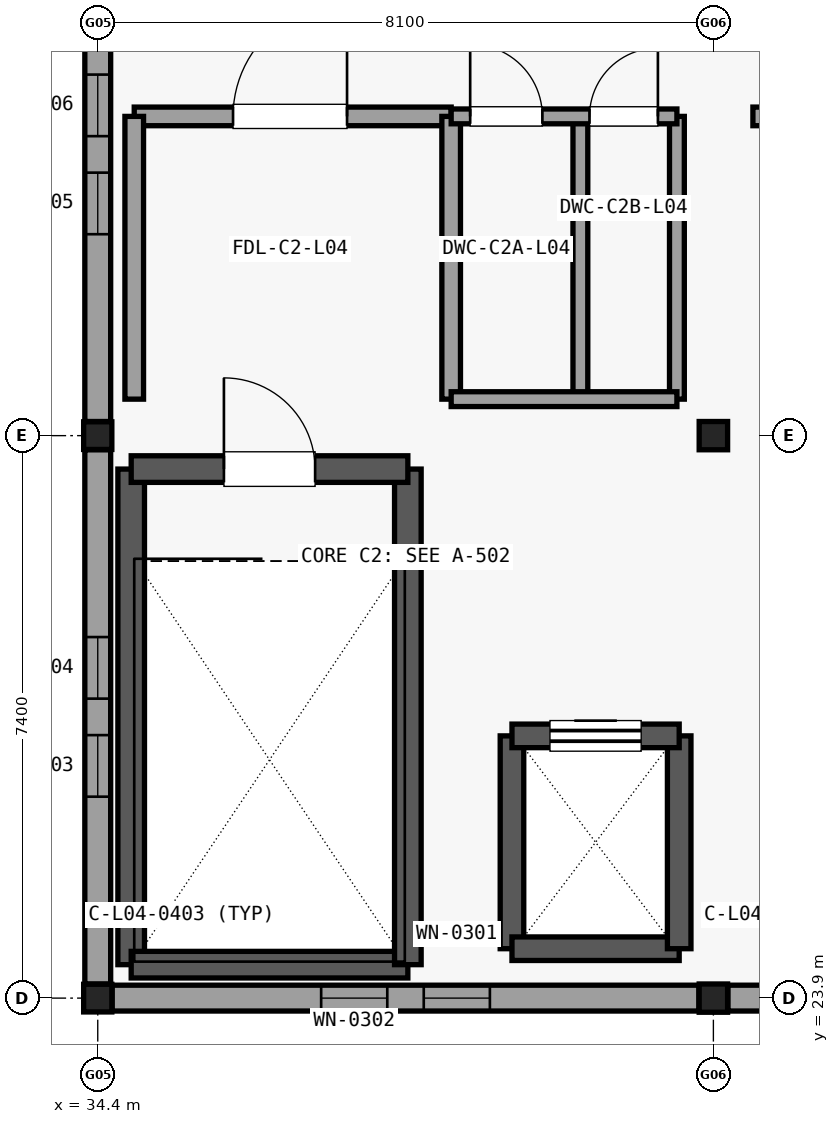
"""IFC4 building model, lengths in metres.
Left out: names, types, materials, properties, quantities, classifications, styles, units other than length and angle.
Written with IfcOpenShell. Run it as: python <this file> out.ifc"""

import sys

from ifc_helpers import new_model, si_unit, direction, frame, frame_2d, origin, origin_2d, place, context, subcontext, project, spatial, rectangle, i_section, extrude, element, fill, save


model = new_model("IFC4")
c1 = context("Model", 3, precision=1e-05, world=origin(), true_north=direction((0.0, 1.0)))
c2 = subcontext(c1, "Body", "Model", "MODEL_VIEW")
j1 = project(units=[si_unit("LENGTHUNIT", "METRE"), si_unit("PLANEANGLEUNIT", "RADIAN")], contexts=[c1])
p1 = place(None, origin())
s1 = spatial("IfcSite", under=j1, at=p1, CompositionType="ELEMENT")
p2 = place(p1, origin())
s2 = spatial("IfcBuilding", under=s1, at=p2, CompositionType="ELEMENT")
p3 = place(p2, frame((0.0, 0.0, 17.4)))
s3 = spatial("IfcBuildingStorey", under=s2, at=p3, CompositionType="ELEMENT", Elevation=17.4)
for number, where, z_axis, x_axis in (
    (1, (34.4, 23.9, 0.0), (0.0, 0.0, 1.0), (1.0, 0.0, 0.0)),
    (2, (34.4, 31.3, 0.0), (0.0, 0.0, 1.0), (1.0, 0.0, 0.0)),
):
    element("IfcColumn", number, at=place(p3, frame(where, z_axis=z_axis, x_axis=x_axis)), inside=s3, PredefinedType="COLUMN", context=c2, shape_type="SweptSolid", body=[
        extrude(i_section(OverallWidth=0.371, OverallDepth=0.364, WebThickness=0.013, FlangeThickness=0.022, at=origin_2d()), origin(), (0.0, 0.0, 1.0), 3.38),
    ])
for number, where, z_axis, x_axis in (
    (3, (42.5, 23.9, 0.0), (0.0, 0.0, 1.0), (1.0, 0.0, 0.0)),
    (4, (42.5, 31.3, 0.0), (0.0, 0.0, 1.0), (1.0, 0.0, 0.0)),
):
    element("IfcColumn", number, at=place(p3, frame(where, z_axis=z_axis, x_axis=x_axis)), inside=s3, PredefinedType="COLUMN", context=c2, shape_type="SweptSolid", body=[
        extrude(i_section(OverallWidth=0.374, OverallDepth=0.372, WebThickness=0.016, FlangeThickness=0.026, at=origin_2d()), origin(), (0.0, 0.0, 1.0), 3.38),
    ])
p4 = place(p3, frame((42.309, 23.9, 0.0), z_axis=(0.0, 0.0, 1.0), x_axis=(-1.0, 0.0, 0.0)))
e5 = element("IfcWall", 5, at=p4, inside=s3, PredefinedType="SOLIDWALL", context=c2, shape_type="SweptSolid", body=[
    extrude(rectangle(XDim=7.719, YDim=0.34, at=frame_2d((3.86, 0.0))), origin(), (0.0, 0.0, 1.0), 2.908),
])
p5 = place(p4, frame((2.75, 0.0, 0.6)))
e6 = element("IfcOpeningElement", 6, at=p5, cuts=e5, PredefinedType="OPENING", context=c2, shape_type="SweptSolid", body=[
    extrude(rectangle(XDim=0.87, YDim=1.82, at=frame_2d((0.435, 0.91))), frame((0.0, 0.18, 0.0), z_axis=(0.0, -1.0, 0.0), x_axis=(1.0, 0.0, 0.0)), (0.0, 0.0, 1.0), 0.36),
])
p6 = place(p4, frame((4.1, 0.0, 0.6)))
e7 = element("IfcOpeningElement", 7, at=p6, cuts=e5, PredefinedType="OPENING", context=c2, shape_type="SweptSolid", body=[
    extrude(rectangle(XDim=0.87, YDim=1.82, at=frame_2d((0.435, 0.91))), frame((0.0, 0.18, 0.0), z_axis=(0.0, -1.0, 0.0), x_axis=(1.0, 0.0, 0.0)), (0.0, 0.0, 1.0), 0.36),
])
p7 = place(p3, frame((34.4, 24.086, 0.0), z_axis=(0.0, 0.0, 1.0), x_axis=(0.0, 1.0, 0.0)))
e8 = element("IfcWall", 8, at=p7, inside=s3, PredefinedType="SOLIDWALL", context=c2, shape_type="SweptSolid", body=[
    extrude(rectangle(XDim=7.028, YDim=0.34, at=frame_2d((3.514, 0.0))), origin(), (0.0, 0.0, 1.0), 2.908),
])
p8 = place(p7, frame((2.464, 0.0, 0.6)))
e9 = element("IfcOpeningElement", 9, at=p8, cuts=e8, PredefinedType="OPENING", context=c2, shape_type="SweptSolid", body=[
    extrude(rectangle(XDim=0.81, YDim=1.84, at=frame_2d((0.405, 0.92))), frame((0.0, 0.18, 0.0), z_axis=(0.0, -1.0, 0.0), x_axis=(1.0, 0.0, 0.0)), (0.0, 0.0, 1.0), 0.36),
])
p9 = place(p7, frame((3.754, 0.0, 0.6)))
e10 = element("IfcOpeningElement", 10, at=p9, cuts=e8, PredefinedType="OPENING", context=c2, shape_type="SweptSolid", body=[
    extrude(rectangle(XDim=0.81, YDim=1.84, at=frame_2d((0.405, 0.92))), frame((0.0, 0.18, 0.0), z_axis=(0.0, -1.0, 0.0), x_axis=(1.0, 0.0, 0.0)), (0.0, 0.0, 1.0), 0.36),
])
p10 = place(p3, frame((34.4, 31.486, 0.0), z_axis=(0.0, 0.0, 1.0), x_axis=(0.0, 1.0, 0.0)))
e11 = element("IfcWall", 11, at=p10, inside=s3, PredefinedType="SOLIDWALL", context=c2, shape_type="SweptSolid", body=[
    extrude(rectangle(XDim=7.028, YDim=0.34, at=frame_2d((3.514, 0.0))), origin(), (0.0, 0.0, 1.0), 2.908),
])
p11 = place(p10, frame((2.464, 0.0, 0.6)))
e12 = element("IfcOpeningElement", 12, at=p11, cuts=e11, PredefinedType="OPENING", context=c2, shape_type="SweptSolid", body=[
    extrude(rectangle(XDim=0.81, YDim=1.84, at=frame_2d((0.405, 0.92))), frame((0.0, 0.18, 0.0), z_axis=(0.0, -1.0, 0.0), x_axis=(1.0, 0.0, 0.0)), (0.0, 0.0, 1.0), 0.36),
])
p12 = place(p10, frame((3.754, 0.0, 0.6)))
e13 = element("IfcOpeningElement", 13, at=p12, cuts=e11, PredefinedType="OPENING", context=c2, shape_type="SweptSolid", body=[
    extrude(rectangle(XDim=0.81, YDim=1.84, at=frame_2d((0.405, 0.92))), frame((0.0, 0.18, 0.0), z_axis=(0.0, -1.0, 0.0), x_axis=(1.0, 0.0, 0.0)), (0.0, 0.0, 1.0), 0.36),
])
p13 = place(p3, frame((50.409, 23.9, 0.0), z_axis=(0.0, 0.0, 1.0), x_axis=(-1.0, 0.0, 0.0)))
e14 = element("IfcWall", 14, at=p13, inside=s3, PredefinedType="SOLIDWALL", context=c2, shape_type="SweptSolid", body=[
    extrude(rectangle(XDim=7.718, YDim=0.34, at=frame_2d((3.859, 0.0))), origin(), (0.0, 0.0, 1.0), 2.908),
])
p14 = place(p13, frame((2.749, 0.0, 0.6)))
e15 = element("IfcOpeningElement", 15, at=p14, cuts=e14, PredefinedType="OPENING", context=c2, shape_type="SweptSolid", body=[
    extrude(rectangle(XDim=0.87, YDim=1.82, at=frame_2d((0.435, 0.91))), frame((0.0, 0.18, 0.0), z_axis=(0.0, -1.0, 0.0), x_axis=(1.0, 0.0, 0.0)), (0.0, 0.0, 1.0), 0.36),
])
p15 = place(p13, frame((4.099, 0.0, 0.6)))
e16 = element("IfcOpeningElement", 16, at=p15, cuts=e14, PredefinedType="OPENING", context=c2, shape_type="SweptSolid", body=[
    extrude(rectangle(XDim=0.87, YDim=1.82, at=frame_2d((0.435, 0.91))), frame((0.0, 0.18, 0.0), z_axis=(0.0, -1.0, 0.0), x_axis=(1.0, 0.0, 0.0)), (0.0, 0.0, 1.0), 0.36),
])
p16 = place(p3, frame((34.84, 24.34, 0.0), z_axis=(0.0, 0.0, 1.0), x_axis=(0.0, 1.0, 0.0)))
e17 = element("IfcWall", 17, at=p16, inside=s3, PredefinedType="SHEAR", context=c2, shape_type="SweptSolid", body=[
    extrude(rectangle(XDim=6.52, YDim=0.35, at=frame_2d((3.26, 0.0))), origin(), (0.0, 0.0, 1.0), 3.375),
])
p17 = place(p3, frame((34.84, 24.34, 0.0), z_axis=(0.0, 0.0, 1.0), x_axis=(1.0, 0.0, 0.0)))
e18 = element("IfcWall", 18, at=p17, inside=s3, PredefinedType="SHEAR", context=c2, shape_type="SweptSolid", body=[
    extrude(rectangle(XDim=3.64, YDim=0.35, at=frame_2d((1.82, 0.0))), origin(), (0.0, 0.0, 1.0), 3.375),
])
p18 = place(p3, frame((38.48, 24.34, 0.0), z_axis=(0.0, 0.0, 1.0), x_axis=(0.0, 1.0, 0.0)))
e19 = element("IfcWall", 19, at=p18, inside=s3, PredefinedType="SHEAR", context=c2, shape_type="SweptSolid", body=[
    extrude(rectangle(XDim=6.52, YDim=0.35, at=frame_2d((3.26, 0.0))), origin(), (0.0, 0.0, 1.0), 3.375),
])
p19 = place(p3, frame((34.84, 30.86, 0.0), z_axis=(0.0, 0.0, 1.0), x_axis=(1.0, 0.0, 0.0)))
e20 = element("IfcWall", 20, at=p19, inside=s3, PredefinedType="SHEAR", context=c2, shape_type="SweptSolid", body=[
    extrude(rectangle(XDim=3.64, YDim=0.35, at=frame_2d((1.82, 0.0))), origin(), (0.0, 0.0, 1.0), 3.375),
])
p20 = place(p19, frame((1.22, 0.0, 0.0)))
e21 = element("IfcOpeningElement", 21, at=p20, cuts=e20, PredefinedType="OPENING", context=c2, shape_type="SweptSolid", body=[
    extrude(rectangle(XDim=1.2, YDim=2.15, at=frame_2d((0.6, 1.075))), frame((0.0, 0.185, 0.0), z_axis=(0.0, -1.0, 0.0), x_axis=(1.0, 0.0, 0.0)), (0.0, 0.0, 1.0), 0.37),
])
p21 = place(p3, frame((39.85, 24.55, 0.0), z_axis=(0.0, 0.0, 1.0), x_axis=(0.0, 1.0, 0.0)))
e22 = element("IfcWall", 22, at=p21, inside=s3, PredefinedType="SHEAR", context=c2, shape_type="SweptSolid", body=[
    extrude(rectangle(XDim=2.8, YDim=0.31, at=frame_2d((1.4, 0.0))), origin(), (0.0, 0.0, 1.0), 3.375),
])
p22 = place(p3, frame((39.85, 24.55, 0.0), z_axis=(0.0, 0.0, 1.0), x_axis=(1.0, 0.0, 0.0)))
e23 = element("IfcWall", 23, at=p22, inside=s3, PredefinedType="SHEAR", context=c2, shape_type="SweptSolid", body=[
    extrude(rectangle(XDim=2.2, YDim=0.31, at=frame_2d((1.1, 0.0))), origin(), (0.0, 0.0, 1.0), 3.375),
])
p23 = place(p3, frame((42.05, 24.55, 0.0), z_axis=(0.0, 0.0, 1.0), x_axis=(0.0, 1.0, 0.0)))
e24 = element("IfcWall", 24, at=p23, inside=s3, PredefinedType="SHEAR", context=c2, shape_type="SweptSolid", body=[
    extrude(rectangle(XDim=2.8, YDim=0.31, at=frame_2d((1.4, 0.0))), origin(), (0.0, 0.0, 1.0), 3.375),
])
p24 = place(p3, frame((39.85, 27.35, 0.0), z_axis=(0.0, 0.0, 1.0), x_axis=(1.0, 0.0, 0.0)))
e25 = element("IfcWall", 25, at=p24, inside=s3, PredefinedType="SHEAR", context=c2, shape_type="SweptSolid", body=[
    extrude(rectangle(XDim=2.2, YDim=0.31, at=frame_2d((1.1, 0.0))), origin(), (0.0, 0.0, 1.0), 3.375),
])
p25 = place(p24, frame((0.5, 0.0, 0.0)))
e26 = element("IfcOpeningElement", 26, at=p25, cuts=e25, PredefinedType="OPENING", context=c2, shape_type="SweptSolid", body=[
    extrude(rectangle(XDim=1.2, YDim=2.15, at=frame_2d((0.6, 1.075))), frame((0.0, 0.165, 0.0), z_axis=(0.0, -1.0, 0.0), x_axis=(1.0, 0.0, 0.0)), (0.0, 0.0, 1.0), 0.33),
])
p26 = place(p3, frame((34.88, 35.5, 0.0), z_axis=(0.0, 0.0, 1.0), x_axis=(1.0, 0.0, 0.0)))
e27 = element("IfcWall", 27, at=p26, inside=s3, PredefinedType="PARTITIONING", context=c2, shape_type="SweptSolid", body=[
    extrude(rectangle(XDim=4.17, YDim=0.245, at=frame_2d((2.085, 0.0))), origin(), (0.0, 0.0, 1.0), 2.913),
])
p27 = place(p26, frame((1.3, 0.0, 0.0)))
e28 = element("IfcOpeningElement", 28, at=p27, cuts=e27, PredefinedType="OPENING", context=c2, shape_type="SweptSolid", body=[
    extrude(rectangle(XDim=1.5, YDim=2.15, at=frame_2d((0.75, 1.075))), frame((0.0, 0.133, 0.0), z_axis=(0.0, -1.0, 0.0), x_axis=(1.0, 0.0, 0.0)), (0.0, 0.0, 1.0), 0.265),
])
for number, where, z_axis, x_axis in (
    (29, (34.88, 31.78, 0.0), (0.0, 0.0, 1.0), (0.0, 1.0, 0.0)),
    (30, (39.05, 31.78, 0.0), (0.0, 0.0, 1.0), (0.0, 1.0, 0.0)),
):
    element("IfcWall", number, at=place(p3, frame(where, z_axis=z_axis, x_axis=x_axis)), inside=s3, PredefinedType="PARTITIONING", context=c2, shape_type="SweptSolid", body=[
        extrude(rectangle(XDim=3.72, YDim=0.245, at=frame_2d((1.86, 0.0))), origin(), (0.0, 0.0, 1.0), 2.913),
    ])
for number, where, z_axis, x_axis in (
    (31, (40.75, 31.78, 0.0), (0.0, 0.0, 1.0), (0.0, 1.0, 0.0)),
    (32, (42.02, 31.78, 0.0), (0.0, 0.0, 1.0), (0.0, 1.0, 0.0)),
):
    element("IfcWall", number, at=place(p3, frame(where, z_axis=z_axis, x_axis=x_axis)), inside=s3, PredefinedType="PARTITIONING", context=c2, shape_type="SweptSolid", body=[
        extrude(rectangle(XDim=3.72, YDim=0.195, at=frame_2d((1.86, 0.0))), origin(), (0.0, 0.0, 1.0), 2.913),
    ])
p28 = place(p3, frame((39.05, 31.78, 0.0), z_axis=(0.0, 0.0, 1.0), x_axis=(1.0, 0.0, 0.0)))
e33 = element("IfcWall", 33, at=p28, inside=s3, PredefinedType="PARTITIONING", context=c2, shape_type="SweptSolid", body=[
    extrude(rectangle(XDim=2.97, YDim=0.195, at=frame_2d((1.485, 0.0))), origin(), (0.0, 0.0, 1.0), 2.913),
])
p29 = place(p3, frame((39.05, 35.5, 0.0), z_axis=(0.0, 0.0, 1.0), x_axis=(1.0, 0.0, 0.0)))
e34 = element("IfcWall", 34, at=p29, inside=s3, PredefinedType="PARTITIONING", context=c2, shape_type="SweptSolid", body=[
    extrude(rectangle(XDim=2.97, YDim=0.195, at=frame_2d((1.485, 0.0))), origin(), (0.0, 0.0, 1.0), 2.913),
])
p30 = place(p29, frame((0.25, 0.0, 0.0)))
e35 = element("IfcOpeningElement", 35, at=p30, cuts=e34, PredefinedType="OPENING", context=c2, shape_type="SweptSolid", body=[
    extrude(rectangle(XDim=0.95, YDim=2.1, at=frame_2d((0.475, 1.05))), frame((0.0, 0.107, 0.0), z_axis=(0.0, -1.0, 0.0), x_axis=(1.0, 0.0, 0.0)), (0.0, 0.0, 1.0), 0.215),
])
p31 = place(p29, frame((1.82, 0.0, 0.0)))
e36 = element("IfcOpeningElement", 36, at=p31, cuts=e34, PredefinedType="OPENING", context=c2, shape_type="SweptSolid", body=[
    extrude(rectangle(XDim=0.9, YDim=2.1, at=frame_2d((0.45, 1.05))), frame((0.0, 0.107, 0.0), z_axis=(0.0, -1.0, 0.0), x_axis=(1.0, 0.0, 0.0)), (0.0, 0.0, 1.0), 0.215),
])
p32 = place(p3, frame((43.02, 35.5, 0.0), z_axis=(0.0, 0.0, 1.0), x_axis=(1.0, 0.0, 0.0)))
e37 = element("IfcWall", 37, at=p32, inside=s3, PredefinedType="PARTITIONING", context=c2, shape_type="SweptSolid", body=[
    extrude(rectangle(XDim=7.06, YDim=0.245, at=frame_2d((3.53, 0.0))), origin(), (0.0, 0.0, 1.0), 2.913),
])
p33 = place(p32, frame((2.58, 0.0, 0.0)))
e38 = element("IfcOpeningElement", 38, at=p33, cuts=e37, PredefinedType="OPENING", context=c2, shape_type="SweptSolid", body=[
    extrude(rectangle(XDim=1.9, YDim=2.25, at=frame_2d((0.95, 1.125))), frame((0.0, 0.133, 0.0), z_axis=(0.0, -1.0, 0.0), x_axis=(1.0, 0.0, 0.0)), (0.0, 0.0, 1.0), 0.265),
])
p34 = place(p5, origin())
e39 = element("IfcWindow", 39, at=p34, inside=s3, PartitioningType="SINGLE_PANEL", PredefinedType="WINDOW", context=c2, shape_type="SweptSolid", body=[
    extrude(rectangle(XDim=0.87, YDim=1.82, at=frame_2d((0.435, 0.91))), frame((0.0, 0.03, 0.0), z_axis=(0.0, -1.0, 0.0), x_axis=(1.0, 0.0, 0.0)), (0.0, 0.0, 1.0), 0.06),
])
fill(e6, e39)
p35 = place(p6, origin())
e40 = element("IfcWindow", 40, at=p35, inside=s3, PartitioningType="SINGLE_PANEL", PredefinedType="WINDOW", context=c2, shape_type="SweptSolid", body=[
    extrude(rectangle(XDim=0.87, YDim=1.82, at=frame_2d((0.435, 0.91))), frame((0.0, 0.03, 0.0), z_axis=(0.0, -1.0, 0.0), x_axis=(1.0, 0.0, 0.0)), (0.0, 0.0, 1.0), 0.06),
])
fill(e7, e40)
p36 = place(p8, origin())
e41 = element("IfcWindow", 41, at=p36, inside=s3, PartitioningType="SINGLE_PANEL", PredefinedType="WINDOW", context=c2, shape_type="SweptSolid", body=[
    extrude(rectangle(XDim=0.81, YDim=1.84, at=frame_2d((0.405, 0.92))), frame((0.0, 0.03, 0.0), z_axis=(0.0, -1.0, 0.0), x_axis=(1.0, 0.0, 0.0)), (0.0, 0.0, 1.0), 0.06),
])
fill(e9, e41)
p37 = place(p9, origin())
e42 = element("IfcWindow", 42, at=p37, inside=s3, PartitioningType="SINGLE_PANEL", PredefinedType="WINDOW", context=c2, shape_type="SweptSolid", body=[
    extrude(rectangle(XDim=0.81, YDim=1.84, at=frame_2d((0.405, 0.92))), frame((0.0, 0.03, 0.0), z_axis=(0.0, -1.0, 0.0), x_axis=(1.0, 0.0, 0.0)), (0.0, 0.0, 1.0), 0.06),
])
fill(e10, e42)
p38 = place(p11, origin())
e43 = element("IfcWindow", 43, at=p38, inside=s3, PartitioningType="SINGLE_PANEL", PredefinedType="WINDOW", context=c2, shape_type="SweptSolid", body=[
    extrude(rectangle(XDim=0.81, YDim=1.84, at=frame_2d((0.405, 0.92))), frame((0.0, 0.03, 0.0), z_axis=(0.0, -1.0, 0.0), x_axis=(1.0, 0.0, 0.0)), (0.0, 0.0, 1.0), 0.06),
])
fill(e12, e43)
p39 = place(p12, origin())
e44 = element("IfcWindow", 44, at=p39, inside=s3, PartitioningType="SINGLE_PANEL", PredefinedType="WINDOW", context=c2, shape_type="SweptSolid", body=[
    extrude(rectangle(XDim=0.81, YDim=1.84, at=frame_2d((0.405, 0.92))), frame((0.0, 0.03, 0.0), z_axis=(0.0, -1.0, 0.0), x_axis=(1.0, 0.0, 0.0)), (0.0, 0.0, 1.0), 0.06),
])
fill(e13, e44)
p40 = place(p20, origin())
e45 = element("IfcDoor", 45, at=p40, inside=s3, OperationType="SINGLE_SWING_LEFT", PredefinedType="DOOR", context=c2, shape_type="SweptSolid", body=[
    extrude(rectangle(XDim=1.2, YDim=2.15, at=frame_2d((0.6, 1.075))), frame((0.0, 0.025, 0.0), z_axis=(0.0, -1.0, 0.0), x_axis=(1.0, 0.0, 0.0)), (0.0, 0.0, 1.0), 0.05),
])
fill(e21, e45)
p41 = place(p25, origin())
e46 = element("IfcDoor", 46, at=p41, inside=s3, OperationType="SLIDING_TO_RIGHT", PredefinedType="DOOR", context=c2, shape_type="SweptSolid", body=[
    extrude(rectangle(XDim=1.2, YDim=2.15, at=frame_2d((0.6, 1.075))), frame((0.0, 0.025, 0.0), z_axis=(0.0, -1.0, 0.0), x_axis=(1.0, 0.0, 0.0)), (0.0, 0.0, 1.0), 0.05),
])
fill(e26, e46)
p42 = place(p27, origin())
e47 = element("IfcDoor", 47, at=p42, inside=s3, OperationType="SINGLE_SWING_RIGHT", PredefinedType="DOOR", context=c2, shape_type="SweptSolid", body=[
    extrude(rectangle(XDim=1.5, YDim=2.15, at=frame_2d((0.75, 1.075))), frame((0.0, 0.025, 0.0), z_axis=(0.0, -1.0, 0.0), x_axis=(1.0, 0.0, 0.0)), (0.0, 0.0, 1.0), 0.05),
])
fill(e28, e47)
p43 = place(p30, origin())
e48 = element("IfcDoor", 48, at=p43, inside=s3, OperationType="SINGLE_SWING_LEFT", PredefinedType="DOOR", context=c2, shape_type="SweptSolid", body=[
    extrude(rectangle(XDim=0.95, YDim=2.1, at=frame_2d((0.475, 1.05))), frame((0.0, 0.025, 0.0), z_axis=(0.0, -1.0, 0.0), x_axis=(1.0, 0.0, 0.0)), (0.0, 0.0, 1.0), 0.05),
])
fill(e35, e48)
p44 = place(p31, origin())
e49 = element("IfcDoor", 49, at=p44, inside=s3, OperationType="SINGLE_SWING_RIGHT", PredefinedType="DOOR", context=c2, shape_type="SweptSolid", body=[
    extrude(rectangle(XDim=0.9, YDim=2.1, at=frame_2d((0.45, 1.05))), frame((0.0, 0.025, 0.0), z_axis=(0.0, -1.0, 0.0), x_axis=(1.0, 0.0, 0.0)), (0.0, 0.0, 1.0), 0.05),
])
fill(e36, e49)
save(model, sys.argv[1])
